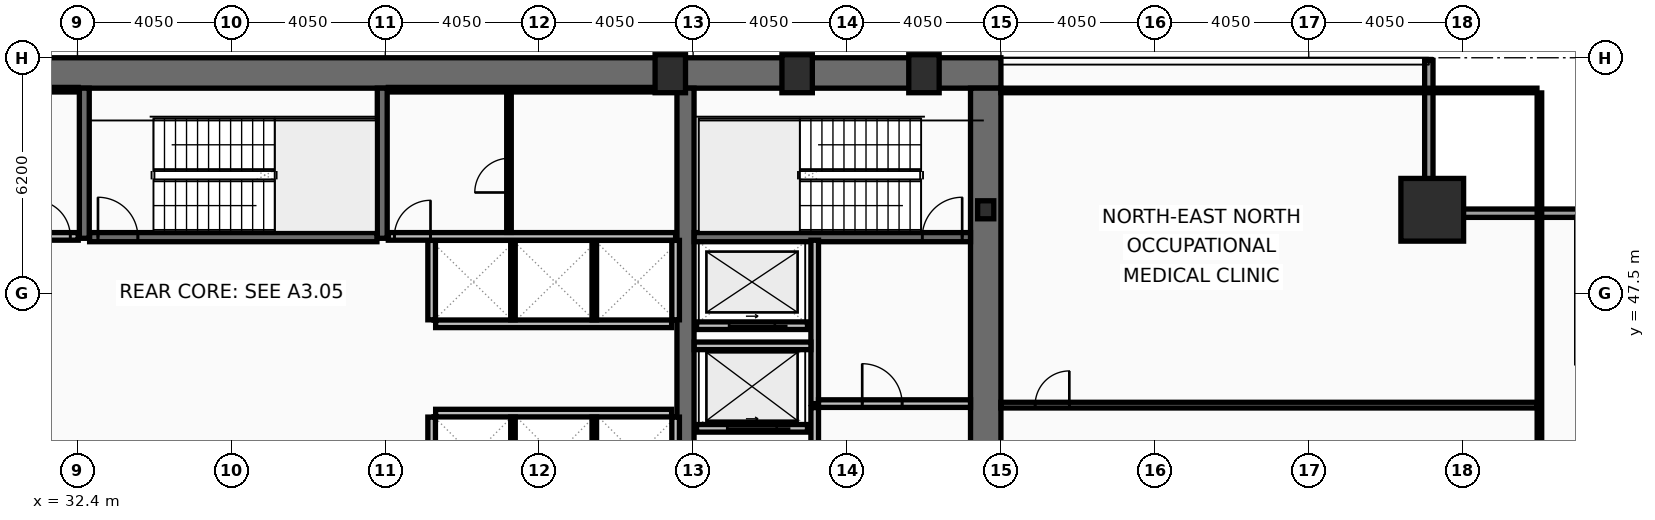
"""IFC4 building model, lengths in metres.
Left out: names, types, materials, properties, quantities, classifications, styles, units other than length and angle.
Written with IfcOpenShell. Run it as: python <this file> out.ifc"""

import sys

from ifc_helpers import new_model, si_unit, direction, frame, frame_2d, origin, origin_2d, place, context, subcontext, project, spatial, rectangle, hollow_rectangle, i_section, extrude, element, fill, save


model = new_model("IFC4")
c1 = context("Model", 3, precision=1e-05, world=origin(), true_north=direction((0.0, 1.0)))
c2 = subcontext(c1, "Body", "Model", "MODEL_VIEW")
j1 = project(units=[si_unit("LENGTHUNIT", "METRE"), si_unit("PLANEANGLEUNIT", "RADIAN")], contexts=[c1])
p1 = place(None, origin())
s1 = spatial("IfcSite", under=j1, at=p1, CompositionType="ELEMENT")
p2 = place(p1, origin())
s2 = spatial("IfcBuilding", under=s1, at=p2, CompositionType="ELEMENT")
p3 = place(p2, frame((0.0, 0.0, 41.8)))
s3 = spatial("IfcBuildingStorey", under=s2, at=p3, CompositionType="ELEMENT", Elevation=41.8)
p4 = place(p3, frame((16.2, 53.3, 0.0), z_axis=(0.0, 0.0, 1.0), x_axis=(1.0, 0.0, 0.0)))
e1 = element("IfcWall", 1, at=p4, inside=s3, PredefinedType="SHEAR", context=c2, shape_type="SweptSolid", body=[
    extrude(rectangle(XDim=40.5, YDim=0.8, at=frame_2d((20.25, 0.0))), origin(), (0.0, 0.0, 1.0), 3.82),
])
p5 = place(p3, frame((56.3, 52.9, 0.0), z_axis=(0.0, 0.0, 1.0), x_axis=(0.0, -1.0, 0.0)))
e2 = element("IfcWall", 2, at=p5, inside=s3, PredefinedType="SHEAR", context=c2, shape_type="SweptSolid", body=[
    extrude(rectangle(XDim=10.8, YDim=0.8, at=frame_2d((5.4, 0.0))), origin(), (0.0, 0.0, 1.0), 3.82),
])
p6 = place(p3, frame((48.4, 42.1, 0.0), z_axis=(0.0, 0.0, 1.0), x_axis=(0.0, 1.0, 0.0)))
e3 = element("IfcWall", 3, at=p6, inside=s3, PredefinedType="SHEAR", context=c2, shape_type="SweptSolid", body=[
    extrude(rectangle(XDim=10.8, YDim=0.45, at=frame_2d((5.4, 0.0))), origin(), (0.0, 0.0, 1.0), 3.82),
])
for number, where, z_axis, x_axis in (
    (4, (32.58, 48.95, 0.0), (0.0, 0.0, 1.0), (0.0, 1.0, 0.0)),
    (5, (40.42, 48.95, 0.0), (0.0, 0.0, 1.0), (0.0, 1.0, 0.0)),
):
    element("IfcWall", number, at=place(p3, frame(where, z_axis=z_axis, x_axis=x_axis)), inside=s3, PredefinedType="SHEAR", context=c2, shape_type="SweptSolid", body=[
        extrude(rectangle(XDim=3.95, YDim=0.26, at=frame_2d((1.975, 0.0))), origin(), (0.0, 0.0, 1.0), 3.82),
    ])
p7 = place(p3, frame((48.63, 48.98, 0.0), z_axis=(0.0, 0.0, 1.0), x_axis=(1.0, 0.0, 0.0)))
e6 = element("IfcWall", 6, at=p7, inside=s3, PredefinedType="SHEAR", context=c2, shape_type="SweptSolid", body=[
    extrude(rectangle(XDim=7.27, YDim=0.24, at=frame_2d((3.635, 0.0))), origin(), (0.0, 0.0, 1.0), 3.82),
])
p8 = place(p7, frame((6.0, 0.0, 0.0)))
e7 = element("IfcOpeningElement", 7, at=p8, cuts=e6, PredefinedType="OPENING", context=c2, shape_type="SweptSolid", body=[
    extrude(rectangle(XDim=1.05, YDim=2.15, at=frame_2d((0.525, 1.075))), frame((0.0, 0.13, 0.0), z_axis=(0.0, -1.0, 0.0), x_axis=(1.0, 0.0, 0.0)), (0.0, 0.0, 1.0), 0.26),
])
p9 = place(p3, frame((32.72, 48.98, 0.0), z_axis=(0.0, 0.0, 1.0), x_axis=(1.0, 0.0, 0.0)))
e8 = element("IfcWall", 8, at=p9, inside=s3, PredefinedType="SHEAR", context=c2, shape_type="SweptSolid", body=[
    extrude(rectangle(XDim=7.56, YDim=0.24, at=frame_2d((3.78, 0.0))), origin(), (0.0, 0.0, 1.0), 3.82),
])
p10 = place(p9, frame((0.22, 0.0, 0.0)))
e9 = element("IfcOpeningElement", 9, at=p10, cuts=e8, PredefinedType="OPENING", context=c2, shape_type="SweptSolid", body=[
    extrude(rectangle(XDim=1.05, YDim=2.15, at=frame_2d((0.525, 1.075))), frame((0.0, 0.13, 0.0), z_axis=(0.0, -1.0, 0.0), x_axis=(1.0, 0.0, 0.0)), (0.0, 0.0, 1.0), 0.26),
])
p11 = place(p3, frame((68.05, 49.7, 0.0), z_axis=(0.0, 0.0, 1.0), x_axis=(1.0, 0.0, 0.0)))
e10 = element("IfcColumn", 10, at=p11, inside=s3, PredefinedType="COLUMN", context=c2, shape_type="SweptSolid", body=[
    extrude(hollow_rectangle(XDim=1.65, YDim=1.65, WallThickness=0.075, at=origin_2d()), origin(), (0.0, 0.0, 1.0), 4.0),
])
for number, where, z_axis, x_axis in (
    (11, (48.0, 53.28, 0.0), (0.0, 0.0, 1.0), (1.0, 0.0, 0.0)),
    (12, (51.337, 53.28, 0.0), (0.0, 0.0, 1.0), (1.0, 0.0, 0.0)),
    (13, (54.675, 53.28, 0.0), (0.0, 0.0, 1.0), (1.0, 0.0, 0.0)),
):
    element("IfcColumn", number, at=place(p3, frame(where, z_axis=z_axis, x_axis=x_axis)), inside=s3, PredefinedType="COLUMN", context=c2, shape_type="SweptSolid", body=[
        extrude(hollow_rectangle(XDim=0.8, YDim=1.0, WallThickness=0.055, at=origin_2d()), origin(), (0.0, 0.0, 1.0), 4.0),
    ])
p12 = place(p3, frame((56.3, 49.7, 0.0), z_axis=(0.0, 0.0, 1.0), x_axis=(1.0, 0.0, 0.0)))
e14 = element("IfcColumn", 14, at=p12, inside=s3, PredefinedType="COLUMN", context=c2, shape_type="SweptSolid", body=[
    extrude(i_section(OverallWidth=0.424, OverallDepth=0.474, WebThickness=0.048, FlangeThickness=0.077, at=origin_2d()), origin(), (0.0, 0.0, 1.0), 4.0),
])
p13 = place(p3, frame((67.96, 53.63, 0.0), z_axis=(0.0, 0.0, 1.0), x_axis=(0.0, -1.0, 0.0)))
e15 = element("IfcWall", 15, at=p13, inside=s3, PredefinedType="SOLIDWALL", context=c2, shape_type="SweptSolid", body=[
    extrude(rectangle(XDim=3.91, YDim=0.22, at=frame_2d((1.955, 0.0))), origin(), (0.0, 0.0, 1.0), 3.16),
])
p14 = place(p3, frame((67.85, 49.61, 0.0), z_axis=(0.0, 0.0, 1.0), x_axis=(1.0, 0.0, 0.0)))
e16 = element("IfcWall", 16, at=p14, inside=s3, PredefinedType="SOLIDWALL", context=c2, shape_type="SweptSolid", body=[
    extrude(rectangle(XDim=4.22, YDim=0.22, at=frame_2d((2.11, 0.0))), origin(), (0.0, 0.0, 1.0), 3.16),
])
p15 = place(p3, frame((51.61, 43.95, 0.0), z_axis=(0.0, 0.0, 1.0), x_axis=(-1.0, 0.0, 0.0)))
e17 = element("IfcWall", 17, at=p15, inside=s3, PredefinedType="PARTITIONING", context=c2, shape_type="SweptSolid", body=[
    extrude(rectangle(XDim=2.92, YDim=0.2, at=frame_2d((1.46, 0.0))), origin(), (0.0, 0.0, 1.0), 3.82),
])
p16 = place(p15, frame((0.81, 0.0, 0.0)))
e18 = element("IfcOpeningElement", 18, at=p16, cuts=e17, PredefinedType="OPENING", context=c2, shape_type="SweptSolid", body=[
    extrude(rectangle(XDim=1.3, YDim=2.18, at=frame_2d((0.65, 1.09))), frame((0.0, 0.11, 0.0), z_axis=(0.0, -1.0, 0.0), x_axis=(1.0, 0.0, 0.0)), (0.0, 0.0, 1.0), 0.22),
])
p17 = place(p3, frame((51.61, 46.65, 0.0), z_axis=(0.0, 0.0, 1.0), x_axis=(-1.0, 0.0, 0.0)))
e19 = element("IfcWall", 19, at=p17, inside=s3, PredefinedType="PARTITIONING", context=c2, shape_type="SweptSolid", body=[
    extrude(rectangle(XDim=2.92, YDim=0.2, at=frame_2d((1.46, 0.0))), origin(), (0.0, 0.0, 1.0), 3.82),
])
p18 = place(p17, frame((0.86, 0.0, 0.0)))
e20 = element("IfcOpeningElement", 20, at=p18, cuts=e19, PredefinedType="OPENING", context=c2, shape_type="SweptSolid", body=[
    extrude(rectangle(XDim=1.2, YDim=2.18, at=frame_2d((0.6, 1.09))), frame((0.0, 0.11, 0.0), z_axis=(0.0, -1.0, 0.0), x_axis=(1.0, 0.0, 0.0)), (0.0, 0.0, 1.0), 0.22),
])
p19 = place(p3, frame((51.8, 44.6, 0.0), z_axis=(0.0, 0.0, 1.0), x_axis=(0.0, 1.0, 0.0)))
e21 = element("IfcWall", 21, at=p19, inside=s3, PredefinedType="PARTITIONING", context=c2, shape_type="SweptSolid", body=[
    extrude(rectangle(XDim=4.3, YDim=0.2, at=frame_2d((2.15, 0.0))), origin(), (0.0, 0.0, 1.0), 3.82),
])
p20 = place(p3, frame((51.9, 44.6, 0.0), z_axis=(0.0, 0.0, 1.0), x_axis=(1.0, 0.0, 0.0)))
e22 = element("IfcWall", 22, at=p20, inside=s3, PredefinedType="PARTITIONING", context=c2, shape_type="SweptSolid", body=[
    extrude(rectangle(XDim=4.0, YDim=0.2, at=frame_2d((2.0, 0.0))), origin(), (0.0, 0.0, 1.0), 3.82),
])
p21 = place(p20, frame((1.15, 0.0, 0.0)))
e23 = element("IfcOpeningElement", 23, at=p21, cuts=e22, PredefinedType="OPENING", context=c2, shape_type="SweptSolid", body=[
    extrude(rectangle(XDim=1.05, YDim=2.15, at=frame_2d((0.525, 1.075))), frame((0.0, 0.11, 0.0), z_axis=(0.0, -1.0, 0.0), x_axis=(1.0, 0.0, 0.0)), (0.0, 0.0, 1.0), 0.22),
])
p22 = place(p3, frame((48.63, 46.12, 0.0), z_axis=(0.0, 0.0, 1.0), x_axis=(1.0, 0.0, 0.0)))
e24 = element("IfcWall", 24, at=p22, inside=s3, PredefinedType="PARTITIONING", context=c2, shape_type="SweptSolid", body=[
    extrude(rectangle(XDim=3.07, YDim=0.2, at=frame_2d((1.535, 0.0))), origin(), (0.0, 0.0, 1.0), 3.82),
])
p23 = place(p3, frame((51.8, 42.1, 0.0), z_axis=(0.0, 0.0, 1.0), x_axis=(0.0, 1.0, 0.0)))
e25 = element("IfcWall", 25, at=p23, inside=s3, PredefinedType="PARTITIONING", context=c2, shape_type="SweptSolid", body=[
    extrude(rectangle(XDim=2.395, YDim=0.2, at=frame_2d((1.198, 0.0))), origin(), (0.0, 0.0, 1.0), 3.82),
])
p24 = place(p23, frame((0.38, 0.0, 0.0)))
e26 = element("IfcOpeningElement", 26, at=p24, cuts=e25, PredefinedType="OPENING", context=c2, shape_type="SweptSolid", body=[
    extrude(rectangle(XDim=1.05, YDim=2.15, at=frame_2d((0.525, 1.075))), frame((0.0, 0.11, 0.0), z_axis=(0.0, -1.0, 0.0), x_axis=(1.0, 0.0, 0.0)), (0.0, 0.0, 1.0), 0.22),
])
p25 = place(p3, frame((41.825, 46.7, 0.0), z_axis=(0.0, 0.0, 1.0), x_axis=(1.0, 0.0, 0.0)))
e27 = element("IfcWall", 27, at=p25, inside=s3, PredefinedType="PARTITIONING", context=c2, shape_type="SweptSolid", body=[
    extrude(rectangle(XDim=6.21, YDim=0.2, at=frame_2d((3.105, 0.0))), origin(), (0.0, 0.0, 1.0), 3.82),
])
for number, where, z_axis, x_axis in (
    (28, (41.72, 46.805, 0.0), (0.0, 0.0, 1.0), (0.0, 1.0, 0.0)),
    (29, (48.14, 46.805, 0.0), (0.0, 0.0, 1.0), (0.0, 1.0, 0.0)),
):
    element("IfcWall", number, at=place(p3, frame(where, z_axis=z_axis, x_axis=x_axis)), inside=s3, PredefinedType="PARTITIONING", context=c2, shape_type="SweptSolid", body=[
        extrude(rectangle(XDim=2.09, YDim=0.2, at=frame_2d((1.045, 0.0))), origin(), (0.0, 0.0, 1.0), 3.82),
    ])
for number, where, z_axis, x_axis in (
    (30, (43.86, 46.805, 0.0), (0.0, 0.0, 1.0), (0.0, 1.0, 0.0)),
    (31, (46.0, 46.805, 0.0), (0.0, 0.0, 1.0), (0.0, 1.0, 0.0)),
):
    element("IfcWall", number, at=place(p3, frame(where, z_axis=z_axis, x_axis=x_axis)), inside=s3, PredefinedType="PARTITIONING", context=c2, shape_type="SweptSolid", body=[
        extrude(rectangle(XDim=2.09, YDim=0.12, at=frame_2d((1.045, 0.0))), origin(), (0.0, 0.0, 1.0), 3.82),
    ])
p26 = place(p3, frame((41.825, 44.35, 0.0), z_axis=(0.0, 0.0, 1.0), x_axis=(1.0, 0.0, 0.0)))
e32 = element("IfcWall", 32, at=p26, inside=s3, PredefinedType="PARTITIONING", context=c2, shape_type="SweptSolid", body=[
    extrude(rectangle(XDim=6.21, YDim=0.2, at=frame_2d((3.105, 0.0))), origin(), (0.0, 0.0, 1.0), 3.82),
])
for number, where, z_axis, x_axis in (
    (33, (41.72, 42.15, 0.0), (0.0, 0.0, 1.0), (0.0, 1.0, 0.0)),
    (34, (48.14, 42.15, 0.0), (0.0, 0.0, 1.0), (0.0, 1.0, 0.0)),
):
    element("IfcWall", number, at=place(p3, frame(where, z_axis=z_axis, x_axis=x_axis)), inside=s3, PredefinedType="PARTITIONING", context=c2, shape_type="SweptSolid", body=[
        extrude(rectangle(XDim=2.095, YDim=0.2, at=frame_2d((1.048, 0.0))), origin(), (0.0, 0.0, 1.0), 3.82),
    ])
for number, where, z_axis, x_axis in (
    (35, (43.86, 42.15, 0.0), (0.0, 0.0, 1.0), (0.0, 1.0, 0.0)),
    (36, (46.0, 42.15, 0.0), (0.0, 0.0, 1.0), (0.0, 1.0, 0.0)),
):
    element("IfcWall", number, at=place(p3, frame(where, z_axis=z_axis, x_axis=x_axis)), inside=s3, PredefinedType="PARTITIONING", context=c2, shape_type="SweptSolid", body=[
        extrude(rectangle(XDim=2.095, YDim=0.12, at=frame_2d((1.048, 0.0))), origin(), (0.0, 0.0, 1.0), 3.82),
    ])
p27 = place(p3, frame((24.7, 52.86, 0.0), z_axis=(0.0, 0.0, 1.0), x_axis=(1.0, 0.0, 0.0)))
e37 = element("IfcWall", 37, at=p27, inside=s3, PredefinedType="PARTITIONING", context=c2, shape_type="SweptSolid", body=[
    extrude(rectangle(XDim=7.72, YDim=0.12, at=frame_2d((3.86, 0.0))), origin(), (0.0, 0.0, 1.0), 3.82),
])
p28 = place(p3, frame((24.7, 49.0, 0.0), z_axis=(0.0, 0.0, 1.0), x_axis=(1.0, 0.0, 0.0)))
e38 = element("IfcWall", 38, at=p28, inside=s3, PredefinedType="PARTITIONING", context=c2, shape_type="SweptSolid", body=[
    extrude(rectangle(XDim=7.72, YDim=0.2, at=frame_2d((3.86, 0.0))), origin(), (0.0, 0.0, 1.0), 3.82),
])
p29 = place(p28, frame((6.56, 0.0, 0.0)))
e39 = element("IfcOpeningElement", 39, at=p29, cuts=e38, PredefinedType="OPENING", context=c2, shape_type="SweptSolid", body=[
    extrude(rectangle(XDim=0.95, YDim=2.1, at=frame_2d((0.475, 1.05))), frame((0.0, 0.11, 0.0), z_axis=(0.0, -1.0, 0.0), x_axis=(1.0, 0.0, 0.0)), (0.0, 0.0, 1.0), 0.22),
])
p30 = place(p3, frame((40.58, 52.86, 0.0), z_axis=(0.0, 0.0, 1.0), x_axis=(1.0, 0.0, 0.0)))
e40 = element("IfcWall", 40, at=p30, inside=s3, PredefinedType="PARTITIONING", context=c2, shape_type="SweptSolid", body=[
    extrude(rectangle(XDim=7.56, YDim=0.12, at=frame_2d((3.78, 0.0))), origin(), (0.0, 0.0, 1.0), 3.82),
])
p31 = place(p3, frame((40.58, 49.0, 0.0), z_axis=(0.0, 0.0, 1.0), x_axis=(1.0, 0.0, 0.0)))
e41 = element("IfcWall", 41, at=p31, inside=s3, PredefinedType="PARTITIONING", context=c2, shape_type="SweptSolid", body=[
    extrude(rectangle(XDim=7.56, YDim=0.2, at=frame_2d((3.78, 0.0))), origin(), (0.0, 0.0, 1.0), 3.82),
])
p32 = place(p31, frame((0.16, 0.0, 0.0)))
e42 = element("IfcOpeningElement", 42, at=p32, cuts=e41, PredefinedType="OPENING", context=c2, shape_type="SweptSolid", body=[
    extrude(rectangle(XDim=0.95, YDim=2.1, at=frame_2d((0.475, 1.05))), frame((0.0, 0.11, 0.0), z_axis=(0.0, -1.0, 0.0), x_axis=(1.0, 0.0, 0.0)), (0.0, 0.0, 1.0), 0.22),
])
p33 = place(p3, frame((43.755, 49.105, 0.0), z_axis=(0.0, 0.0, 1.0), x_axis=(0.0, 1.0, 0.0)))
e43 = element("IfcWall", 43, at=p33, inside=s3, PredefinedType="PARTITIONING", context=c2, shape_type="SweptSolid", body=[
    extrude(rectangle(XDim=3.69, YDim=0.12, at=frame_2d((1.845, 0.0))), origin(), (0.0, 0.0, 1.0), 3.82),
])
p34 = place(p33, frame((1.05, 0.0, 0.0)))
e44 = element("IfcOpeningElement", 44, at=p34, cuts=e43, PredefinedType="OPENING", context=c2, shape_type="SweptSolid", body=[
    extrude(rectangle(XDim=0.9, YDim=2.05, at=frame_2d((0.45, 1.025))), frame((0.0, 0.07, 0.0), z_axis=(0.0, -1.0, 0.0), x_axis=(1.0, 0.0, 0.0)), (0.0, 0.0, 1.0), 0.14),
])
p35 = place(p3, frame((56.7, 44.56, 0.0), z_axis=(0.0, 0.0, 1.0), x_axis=(1.0, 0.0, 0.0)))
e45 = element("IfcWall", 45, at=p35, inside=s3, PredefinedType="PARTITIONING", context=c2, shape_type="SweptSolid", body=[
    extrude(rectangle(XDim=14.105, YDim=0.15, at=frame_2d((7.052, 0.0))), origin(), (0.0, 0.0, 1.0), 3.16),
])
p36 = place(p35, frame((0.9, 0.0, 0.0)))
e46 = element("IfcOpeningElement", 46, at=p36, cuts=e45, PredefinedType="OPENING", context=c2, shape_type="SweptSolid", body=[
    extrude(rectangle(XDim=0.9, YDim=2.05, at=frame_2d((0.45, 1.025))), frame((0.0, 0.085, 0.0), z_axis=(0.0, -1.0, 0.0), x_axis=(1.0, 0.0, 0.0)), (0.0, 0.0, 1.0), 0.17),
])
p37 = place(p3, frame((70.87, 10.665, 0.0), z_axis=(0.0, 0.0, 1.0), x_axis=(0.0, 1.0, 0.0)))
e47 = element("IfcWall", 47, at=p37, inside=s3, PredefinedType="PARTITIONING", context=c2, shape_type="SweptSolid", body=[
    extrude(rectangle(XDim=42.11, YDim=0.12, at=frame_2d((21.055, 0.0))), origin(), (0.0, 0.0, 1.0), 3.01),
])
p38 = place(p3, frame((56.7, 52.84, 0.0), z_axis=(0.0, 0.0, 1.0), x_axis=(1.0, 0.0, 0.0)))
e48 = element("IfcWall", 48, at=p38, inside=s3, PredefinedType="PARTITIONING", context=c2, shape_type="SweptSolid", body=[
    extrude(rectangle(XDim=14.105, YDim=0.12, at=frame_2d((7.052, 0.0))), origin(), (0.0, 0.0, 1.0), 3.82),
])
p39 = place(p8, origin())
e49 = element("IfcDoor", 49, at=p39, inside=s3, OperationType="SINGLE_SWING_RIGHT", PredefinedType="DOOR", context=c2, shape_type="SweptSolid", body=[
    extrude(rectangle(XDim=1.05, YDim=2.15, at=frame_2d((0.525, 1.075))), frame((0.0, 0.025, 0.0), z_axis=(0.0, -1.0, 0.0), x_axis=(1.0, 0.0, 0.0)), (0.0, 0.0, 1.0), 0.05),
])
fill(e7, e49)
p40 = place(p10, origin())
e50 = element("IfcDoor", 50, at=p40, inside=s3, OperationType="SINGLE_SWING_LEFT", PredefinedType="DOOR", context=c2, shape_type="SweptSolid", body=[
    extrude(rectangle(XDim=1.05, YDim=2.15, at=frame_2d((0.525, 1.075))), frame((0.0, 0.025, 0.0), z_axis=(0.0, -1.0, 0.0), x_axis=(1.0, 0.0, 0.0)), (0.0, 0.0, 1.0), 0.05),
])
fill(e9, e50)
p41 = place(p16, origin())
e51 = element("IfcDoor", 51, at=p41, inside=s3, OperationType="SLIDING_TO_LEFT", PredefinedType="DOOR", context=c2, shape_type="SweptSolid", body=[
    extrude(rectangle(XDim=1.3, YDim=2.18, at=frame_2d((0.65, 1.09))), frame((0.0, 0.025, 0.0), z_axis=(0.0, -1.0, 0.0), x_axis=(1.0, 0.0, 0.0)), (0.0, 0.0, 1.0), 0.05),
])
fill(e18, e51)
p42 = place(p18, origin())
e52 = element("IfcDoor", 52, at=p42, inside=s3, OperationType="SLIDING_TO_LEFT", PredefinedType="DOOR", context=c2, shape_type="SweptSolid", body=[
    extrude(rectangle(XDim=1.2, YDim=2.18, at=frame_2d((0.6, 1.09))), frame((0.0, 0.025, 0.0), z_axis=(0.0, -1.0, 0.0), x_axis=(1.0, 0.0, 0.0)), (0.0, 0.0, 1.0), 0.05),
])
fill(e20, e52)
p43 = place(p21, origin())
e53 = element("IfcDoor", 53, at=p43, inside=s3, OperationType="SINGLE_SWING_LEFT", PredefinedType="DOOR", context=c2, shape_type="SweptSolid", body=[
    extrude(rectangle(XDim=1.05, YDim=2.15, at=frame_2d((0.525, 1.075))), frame((0.0, 0.025, 0.0), z_axis=(0.0, -1.0, 0.0), x_axis=(1.0, 0.0, 0.0)), (0.0, 0.0, 1.0), 0.05),
])
fill(e23, e53)
p44 = place(p29, origin())
e54 = element("IfcDoor", 54, at=p44, inside=s3, OperationType="SINGLE_SWING_LEFT", PredefinedType="DOOR", context=c2, shape_type="SweptSolid", body=[
    extrude(rectangle(XDim=0.95, YDim=2.1, at=frame_2d((0.475, 1.05))), frame((0.0, 0.025, 0.0), z_axis=(0.0, -1.0, 0.0), x_axis=(1.0, 0.0, 0.0)), (0.0, 0.0, 1.0), 0.05),
])
fill(e39, e54)
p45 = place(p32, origin())
e55 = element("IfcDoor", 55, at=p45, inside=s3, OperationType="SINGLE_SWING_RIGHT", PredefinedType="DOOR", context=c2, shape_type="SweptSolid", body=[
    extrude(rectangle(XDim=0.95, YDim=2.1, at=frame_2d((0.475, 1.05))), frame((0.0, 0.025, 0.0), z_axis=(0.0, -1.0, 0.0), x_axis=(1.0, 0.0, 0.0)), (0.0, 0.0, 1.0), 0.05),
])
fill(e42, e55)
p46 = place(p34, origin())
e56 = element("IfcDoor", 56, at=p46, inside=s3, OperationType="SINGLE_SWING_LEFT", PredefinedType="DOOR", context=c2, shape_type="SweptSolid", body=[
    extrude(rectangle(XDim=0.9, YDim=2.05, at=frame_2d((0.45, 1.025))), frame((0.0, 0.025, 0.0), z_axis=(0.0, -1.0, 0.0), x_axis=(1.0, 0.0, 0.0)), (0.0, 0.0, 1.0), 0.05),
])
fill(e44, e56)
p47 = place(p36, origin())
e57 = element("IfcDoor", 57, at=p47, inside=s3, OperationType="SINGLE_SWING_RIGHT", PredefinedType="DOOR", context=c2, shape_type="SweptSolid", body=[
    extrude(rectangle(XDim=0.9, YDim=2.05, at=frame_2d((0.45, 1.025))), frame((0.0, 0.025, 0.0), z_axis=(0.0, -1.0, 0.0), x_axis=(1.0, 0.0, 0.0)), (0.0, 0.0, 1.0), 0.05),
])
fill(e46, e57)
save(model, sys.argv[1])
